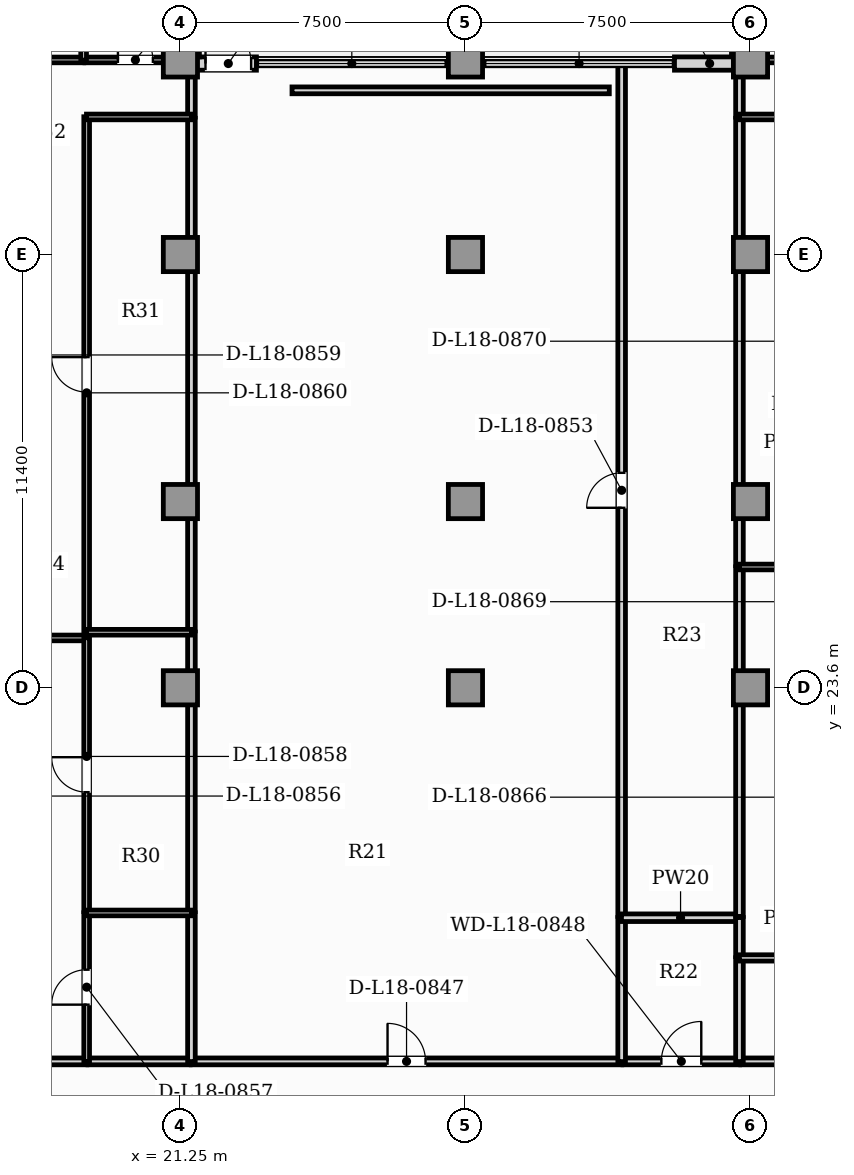
"""IFC4 building model, lengths in metres.
Left out: names, types, materials, properties, quantities, classifications, styles, units other than length and angle.
Written with IfcOpenShell. Run it as: python <this file> out.ifc"""

import sys

from ifc_helpers import new_model, si_unit, direction, frame, frame_2d, origin, origin_2d, place, context, subcontext, project, spatial, rectangle, extrude, element, fill, save


model = new_model("IFC4")
c1 = context("Model", 3, precision=1e-05, world=origin(), true_north=direction((0.0, 1.0)))
c2 = subcontext(c1, "Body", "Model", "MODEL_VIEW")
j1 = project(units=[si_unit("LENGTHUNIT", "METRE"), si_unit("PLANEANGLEUNIT", "RADIAN")], contexts=[c1])
p1 = place(None, origin())
s1 = spatial("IfcSite", under=j1, at=p1, CompositionType="ELEMENT")
p2 = place(p1, origin())
s2 = spatial("IfcBuilding", under=s1, at=p2, CompositionType="ELEMENT")
p3 = place(p2, frame((0.0, 0.0, 76.0)))
s3 = spatial("IfcBuildingStorey", under=s2, at=p3, CompositionType="ELEMENT", Elevation=76.0)
for number, where, z_axis, x_axis in (
    (1, (21.25, 23.6, 0.0), (0.0, 0.0, 1.0), (1.0, 0.0, 0.0)),
    (2, (28.75, 23.6, 0.0), (0.0, 0.0, 1.0), (1.0, 0.0, 0.0)),
    (3, (36.25, 23.6, 0.0), (0.0, 0.0, 1.0), (1.0, 0.0, 0.0)),
    (4, (21.25, 28.5, 0.0), (0.0, 0.0, 1.0), (1.0, 0.0, 0.0)),
    (5, (28.75, 28.5, 0.0), (0.0, 0.0, 1.0), (1.0, 0.0, 0.0)),
    (6, (36.25, 28.5, 0.0), (0.0, 0.0, 1.0), (1.0, 0.0, 0.0)),
    (7, (21.25, 40.12, 0.0), (0.0, 0.0, 1.0), (1.0, 0.0, 0.0)),
    (8, (28.75, 40.12, 0.0), (0.0, 0.0, 1.0), (1.0, 0.0, 0.0)),
    (9, (36.25, 40.12, 0.0), (0.0, 0.0, 1.0), (1.0, 0.0, 0.0)),
    (10, (21.25, 35.0, 0.0), (0.0, 0.0, 1.0), (1.0, 0.0, 0.0)),
    (11, (28.75, 35.0, 0.0), (0.0, 0.0, 1.0), (1.0, 0.0, 0.0)),
    (12, (36.25, 35.0, 0.0), (0.0, 0.0, 1.0), (1.0, 0.0, 0.0)),
):
    element("IfcColumn", number, at=place(p3, frame(where, z_axis=z_axis, x_axis=x_axis)), inside=s3, PredefinedType="COLUMN", context=c2, shape_type="SweptSolid", body=[
        extrude(rectangle(XDim=0.9, YDim=0.9, at=origin_2d()), origin(), (0.0, 0.0, 1.0), 5.05),
    ])
p4 = place(p3, frame((35.925, 46.36, 0.0), z_axis=(0.0, 0.0, 1.0), x_axis=(0.0, -1.0, 0.0)))
e13 = element("IfcWall", 13, at=p4, inside=s3, PredefinedType="SOLIDWALL", context=c2, shape_type="SweptSolid", body=[
    extrude(rectangle(XDim=6.16, YDim=0.35, at=frame_2d((3.08, 0.0))), origin(), (0.0, 0.0, 1.0), 4.8),
])
p5 = place(p3, frame((21.4, 40.025, 0.0), z_axis=(0.0, 0.0, 1.0), x_axis=(1.0, 0.0, 0.0)))
e14 = element("IfcWall", 14, at=p5, inside=s3, PredefinedType="SOLIDWALL", context=c2, shape_type="SweptSolid", body=[
    extrude(rectangle(XDim=1.85, YDim=0.35, at=frame_2d((0.925, 0.0))), origin(), (0.0, 0.0, 1.0), 4.8),
])
p6 = place(p5, frame((0.51, 0.0, 0.0)))
e15 = element("IfcOpeningElement", 15, at=p6, cuts=e14, PredefinedType="OPENING", context=c2, shape_type="SweptSolid", body=[
    extrude(rectangle(XDim=1.2, YDim=2.2, at=frame_2d((0.6, 1.1))), frame((0.0, 0.185, 0.0), z_axis=(0.0, -1.0, 0.0), x_axis=(1.0, 0.0, 0.0)), (0.0, 0.0, 1.0), 0.37),
])
p7 = place(p3, frame((34.25, 40.025, 0.0), z_axis=(0.0, 0.0, 1.0), x_axis=(1.0, 0.0, 0.0)))
e16 = element("IfcWall", 16, at=p7, inside=s3, PredefinedType="SOLIDWALL", context=c2, shape_type="SweptSolid", body=[
    extrude(rectangle(XDim=1.85, YDim=0.35, at=frame_2d((0.925, 0.0))), origin(), (0.0, 0.0, 1.0), 4.8),
])
p8 = place(p3, frame((21.575, 40.2, 0.0), z_axis=(0.0, 0.0, 1.0), x_axis=(0.0, 1.0, 0.0)))
e17 = element("IfcWall", 17, at=p8, inside=s3, PredefinedType="SOLIDWALL", context=c2, shape_type="SweptSolid", body=[
    extrude(rectangle(XDim=6.16, YDim=0.35, at=frame_2d((3.08, 0.0))), origin(), (0.0, 0.0, 1.0), 4.8),
])
p9 = place(p8, frame((0.77, 0.0, 0.88)))
e18 = element("IfcOpeningElement", 18, at=p9, cuts=e17, PredefinedType="OPENING", context=c2, shape_type="SweptSolid", body=[
    extrude(rectangle(XDim=1.65, YDim=2.0, at=frame_2d((0.825, 1.0))), frame((0.0, 0.185, 0.0), z_axis=(0.0, -1.0, 0.0), x_axis=(1.0, 0.0, 0.0)), (0.0, 0.0, 1.0), 0.37),
])
p10 = place(p3, frame((21.535, 13.77, 0.0), z_axis=(0.0, 0.0, 1.0), x_axis=(1.0, 0.0, 0.0)))
e19 = element("IfcWall", 19, at=p10, inside=s3, PredefinedType="PARTITIONING", context=c2, shape_type="SweptSolid", body=[
    extrude(rectangle(XDim=11.33, YDim=0.18, at=frame_2d((5.665, 0.0))), origin(), (0.0, 0.0, 1.0), 4.8),
])
p11 = place(p10, frame((5.165, 0.0, 0.0)))
e20 = element("IfcOpeningElement", 20, at=p11, cuts=e19, PredefinedType="OPENING", context=c2, shape_type="SweptSolid", body=[
    extrude(rectangle(XDim=1.0, YDim=2.15, at=frame_2d((0.5, 1.075))), frame((0.0, 0.1, 0.0), z_axis=(0.0, -1.0, 0.0), x_axis=(1.0, 0.0, 0.0)), (0.0, 0.0, 1.0), 0.2),
])
p12 = place(p3, frame((32.895, 13.77, 0.0), z_axis=(0.0, 0.0, 1.0), x_axis=(1.0, 0.0, 0.0)))
e21 = element("IfcWall", 21, at=p12, inside=s3, PredefinedType="PARTITIONING", context=c2, shape_type="SweptSolid", body=[
    extrude(rectangle(XDim=3.07, YDim=0.18, at=frame_2d((1.535, 0.0))), origin(), (0.0, 0.0, 1.0), 4.8),
])
p13 = place(p12, frame((1.01, 0.0, 0.0)))
e22 = element("IfcOpeningElement", 22, at=p13, cuts=e21, PredefinedType="OPENING", context=c2, shape_type="SweptSolid", body=[
    extrude(rectangle(XDim=1.05, YDim=2.15, at=frame_2d((0.525, 1.075))), frame((0.0, 0.1, 0.0), z_axis=(0.0, -1.0, 0.0), x_axis=(1.0, 0.0, 0.0)), (0.0, 0.0, 1.0), 0.2),
])
p14 = place(p3, frame((14.602, 13.77, 0.0), z_axis=(0.0, 0.0, 1.0), x_axis=(1.0, 0.0, 0.0)))
e23 = element("IfcWall", 23, at=p14, inside=s3, PredefinedType="PARTITIONING", context=c2, shape_type="SweptSolid", body=[
    extrude(rectangle(XDim=4.186, YDim=0.18, at=frame_2d((2.093, 0.0))), origin(), (0.0, 0.0, 1.0), 4.8),
])
p15 = place(p14, frame((1.593, 0.0, 0.0)))
e24 = element("IfcOpeningElement", 24, at=p15, cuts=e23, PredefinedType="OPENING", context=c2, shape_type="SweptSolid", body=[
    extrude(rectangle(XDim=1.0, YDim=2.15, at=frame_2d((0.5, 1.075))), frame((0.0, 0.1, 0.0), z_axis=(0.0, -1.0, 0.0), x_axis=(1.0, 0.0, 0.0)), (0.0, 0.0, 1.0), 0.2),
])
p16 = place(p3, frame((18.818, 13.77, 0.0), z_axis=(0.0, 0.0, 1.0), x_axis=(1.0, 0.0, 0.0)))
e25 = element("IfcWall", 25, at=p16, inside=s3, PredefinedType="PARTITIONING", context=c2, shape_type="SweptSolid", body=[
    extrude(rectangle(XDim=2.687, YDim=0.18, at=frame_2d((1.343, 0.0))), origin(), (0.0, 0.0, 1.0), 4.8),
])
p17 = place(p3, frame((35.995, 13.77, 0.0), z_axis=(0.0, 0.0, 1.0), x_axis=(1.0, 0.0, 0.0)))
e26 = element("IfcWall", 26, at=p17, inside=s3, PredefinedType="PARTITIONING", context=c2, shape_type="SweptSolid", body=[
    extrude(rectangle(XDim=2.706, YDim=0.18, at=frame_2d((1.353, 0.0))), origin(), (0.0, 0.0, 1.0), 4.8),
])
p18 = place(p3, frame((32.86, 13.765, 0.0), z_axis=(0.0, 0.0, 1.0), x_axis=(0.0, 1.0, 0.0)))
e27 = element("IfcWall", 27, at=p18, inside=s3, PredefinedType="PARTITIONING", context=c2, shape_type="SweptSolid", body=[
    extrude(rectangle(XDim=3.79, YDim=0.2, at=frame_2d((1.895, 0.0))), origin(), (0.0, 0.0, 1.0), 4.8),
])
p19 = place(p3, frame((32.86, 17.585, 0.0), z_axis=(0.0, 0.0, 1.0), x_axis=(0.0, 1.0, 0.0)))
e28 = element("IfcWall", 28, at=p19, inside=s3, PredefinedType="PARTITIONING", context=c2, shape_type="SweptSolid", body=[
    extrude(rectangle(XDim=22.422, YDim=0.2, at=frame_2d((11.211, 0.0))), origin(), (0.0, 0.0, 1.0), 4.8),
])
p20 = place(p19, frame((10.751, 0.0, 0.0)))
e29 = element("IfcOpeningElement", 29, at=p20, cuts=e28, PredefinedType="OPENING", context=c2, shape_type="SweptSolid", body=[
    extrude(rectangle(XDim=0.92, YDim=2.1, at=frame_2d((0.46, 1.05))), frame((0.0, 0.11, 0.0), z_axis=(0.0, -1.0, 0.0), x_axis=(1.0, 0.0, 0.0)), (0.0, 0.0, 1.0), 0.22),
])
p21 = place(p3, frame((21.54, 38.615, 0.0), z_axis=(0.0, 0.0, 1.0), x_axis=(0.0, 1.0, 0.0)))
e30 = element("IfcWall", 30, at=p21, inside=s3, PredefinedType="PARTITIONING", context=c2, shape_type="SweptSolid", body=[
    extrude(rectangle(XDim=1.375, YDim=0.2, at=frame_2d((0.688, 0.0))), origin(), (0.0, 0.0, 1.0), 4.8),
])
p22 = place(p3, frame((21.54, 13.765, 0.0), z_axis=(0.0, 0.0, 1.0), x_axis=(0.0, 1.0, 0.0)))
e31 = element("IfcWall", 31, at=p22, inside=s3, PredefinedType="PARTITIONING", context=c2, shape_type="SweptSolid", body=[
    extrude(rectangle(XDim=3.916, YDim=0.2, at=frame_2d((1.958, 0.0))), origin(), (0.0, 0.0, 1.0), 4.8),
])
p23 = place(p3, frame((21.54, 17.711, 0.0), z_axis=(0.0, 0.0, 1.0), x_axis=(0.0, 1.0, 0.0)))
e32 = element("IfcWall", 32, at=p23, inside=s3, PredefinedType="PARTITIONING", context=c2, shape_type="SweptSolid", body=[
    extrude(rectangle(XDim=7.356, YDim=0.2, at=frame_2d((3.678, 0.0))), origin(), (0.0, 0.0, 1.0), 4.8),
])
p24 = place(p3, frame((21.54, 25.097, 0.0), z_axis=(0.0, 0.0, 1.0), x_axis=(0.0, 1.0, 0.0)))
e33 = element("IfcWall", 33, at=p24, inside=s3, PredefinedType="PARTITIONING", context=c2, shape_type="SweptSolid", body=[
    extrude(rectangle(XDim=13.488, YDim=0.2, at=frame_2d((6.744, 0.0))), origin(), (0.0, 0.0, 1.0), 4.8),
])
p25 = place(p3, frame((32.855, 17.55, 0.0), z_axis=(0.0, 0.0, 1.0), x_axis=(1.0, 0.0, 0.0)))
e34 = element("IfcWall", 34, at=p25, inside=s3, PredefinedType="PARTITIONING", context=c2, shape_type="SweptSolid", body=[
    extrude(rectangle(XDim=3.11, YDim=0.2, at=frame_2d((1.555, 0.0))), origin(), (0.0, 0.0, 1.0), 4.8),
])
p26 = place(p3, frame((35.96, 13.765, 0.0), z_axis=(0.0, 0.0, 1.0), x_axis=(0.0, 1.0, 0.0)))
e35 = element("IfcWall", 35, at=p26, inside=s3, PredefinedType="PARTITIONING", context=c2, shape_type="SweptSolid", body=[
    extrude(rectangle(XDim=2.732, YDim=0.2, at=frame_2d((1.366, 0.0))), origin(), (0.0, 0.0, 1.0), 4.8),
])
p27 = place(p3, frame((35.96, 16.527, 0.0), z_axis=(0.0, 0.0, 1.0), x_axis=(0.0, 1.0, 0.0)))
e36 = element("IfcWall", 36, at=p27, inside=s3, PredefinedType="PARTITIONING", context=c2, shape_type="SweptSolid", body=[
    extrude(rectangle(XDim=1.028, YDim=0.2, at=frame_2d((0.514, 0.0))), origin(), (0.0, 0.0, 1.0), 4.8),
])
p28 = place(p3, frame((35.96, 38.615, 0.0), z_axis=(0.0, 0.0, 1.0), x_axis=(0.0, 1.0, 0.0)))
e37 = element("IfcWall", 37, at=p28, inside=s3, PredefinedType="PARTITIONING", context=c2, shape_type="SweptSolid", body=[
    extrude(rectangle(XDim=1.375, YDim=0.2, at=frame_2d((0.688, 0.0))), origin(), (0.0, 0.0, 1.0), 4.8),
])
p29 = place(p3, frame((35.96, 17.585, 0.0), z_axis=(0.0, 0.0, 1.0), x_axis=(0.0, 1.0, 0.0)))
e38 = element("IfcWall", 38, at=p29, inside=s3, PredefinedType="PARTITIONING", context=c2, shape_type="SweptSolid", body=[
    extrude(rectangle(XDim=9.198, YDim=0.2, at=frame_2d((4.599, 0.0))), origin(), (0.0, 0.0, 1.0), 4.8),
])
p30 = place(p3, frame((35.96, 26.813, 0.0), z_axis=(0.0, 0.0, 1.0), x_axis=(0.0, 1.0, 0.0)))
e39 = element("IfcWall", 39, at=p30, inside=s3, PredefinedType="PARTITIONING", context=c2, shape_type="SweptSolid", body=[
    extrude(rectangle(XDim=11.771, YDim=0.2, at=frame_2d((5.886, 0.0))), origin(), (0.0, 0.0, 1.0), 4.8),
])
p31 = place(p3, frame((14.602, 24.912, 0.0), z_axis=(0.0, 0.0, 1.0), x_axis=(1.0, 0.0, 0.0)))
e40 = element("IfcWall", 40, at=p31, inside=s3, PredefinedType="PARTITIONING", context=c2, shape_type="SweptSolid", body=[
    extrude(rectangle(XDim=4.186, YDim=0.15, at=frame_2d((2.093, 0.0))), origin(), (0.0, 0.0, 1.0), 4.8),
])
p32 = place(p31, frame((1.633, 0.0, 0.0)))
e41 = element("IfcOpeningElement", 41, at=p32, cuts=e40, PredefinedType="OPENING", context=c2, shape_type="SweptSolid", body=[
    extrude(rectangle(XDim=0.92, YDim=2.1, at=frame_2d((0.46, 1.05))), frame((0.0, 0.085, 0.0), z_axis=(0.0, -1.0, 0.0), x_axis=(1.0, 0.0, 0.0)), (0.0, 0.0, 1.0), 0.17),
])
p33 = place(p3, frame((18.783, 13.765, 0.0), z_axis=(0.0, 0.0, 1.0), x_axis=(0.0, 1.0, 0.0)))
e42 = element("IfcWall", 42, at=p33, inside=s3, PredefinedType="PARTITIONING", context=c2, shape_type="SweptSolid", body=[
    extrude(rectangle(XDim=3.916, YDim=0.15, at=frame_2d((1.958, 0.0))), origin(), (0.0, 0.0, 1.0), 4.8),
])
p34 = place(p33, frame((1.498, 0.0, 0.0)))
e43 = element("IfcOpeningElement", 43, at=p34, cuts=e42, PredefinedType="OPENING", context=c2, shape_type="SweptSolid", body=[
    extrude(rectangle(XDim=0.92, YDim=2.1, at=frame_2d((0.46, 1.05))), frame((0.0, 0.085, 0.0), z_axis=(0.0, -1.0, 0.0), x_axis=(1.0, 0.0, 0.0)), (0.0, 0.0, 1.0), 0.17),
])
p35 = place(p3, frame((18.783, 17.711, 0.0), z_axis=(0.0, 0.0, 1.0), x_axis=(0.0, 1.0, 0.0)))
e44 = element("IfcWall", 44, at=p35, inside=s3, PredefinedType="PARTITIONING", context=c2, shape_type="SweptSolid", body=[
    extrude(rectangle(XDim=7.206, YDim=0.15, at=frame_2d((3.603, 0.0))), origin(), (0.0, 0.0, 1.0), 4.8),
])
p36 = place(p35, frame((3.143, 0.0, 0.0)))
e45 = element("IfcOpeningElement", 45, at=p36, cuts=e44, PredefinedType="OPENING", context=c2, shape_type="SweptSolid", body=[
    extrude(rectangle(XDim=0.92, YDim=2.1, at=frame_2d((0.46, 1.05))), frame((0.0, 0.085, 0.0), z_axis=(0.0, -1.0, 0.0), x_axis=(1.0, 0.0, 0.0)), (0.0, 0.0, 1.0), 0.17),
])
p37 = place(p3, frame((18.783, 25.057, 0.0), z_axis=(0.0, 0.0, 1.0), x_axis=(0.0, 1.0, 0.0)))
e46 = element("IfcWall", 46, at=p37, inside=s3, PredefinedType="PARTITIONING", context=c2, shape_type="SweptSolid", body=[
    extrude(rectangle(XDim=13.568, YDim=0.15, at=frame_2d((6.784, 0.0))), origin(), (0.0, 0.0, 1.0), 4.8),
])
p38 = place(p37, frame((6.324, 0.0, 0.0)))
e47 = element("IfcOpeningElement", 47, at=p38, cuts=e46, PredefinedType="OPENING", context=c2, shape_type="SweptSolid", body=[
    extrude(rectangle(XDim=0.92, YDim=2.1, at=frame_2d((0.46, 1.05))), frame((0.0, 0.085, 0.0), z_axis=(0.0, -1.0, 0.0), x_axis=(1.0, 0.0, 0.0)), (0.0, 0.0, 1.0), 0.17),
])
p39 = place(p3, frame((18.778, 38.62, 0.0), z_axis=(0.0, 0.0, 1.0), x_axis=(1.0, 0.0, 0.0)))
e48 = element("IfcWall", 48, at=p39, inside=s3, PredefinedType="PARTITIONING", context=c2, shape_type="SweptSolid", body=[
    extrude(rectangle(XDim=2.767, YDim=0.15, at=frame_2d((1.383, 0.0))), origin(), (0.0, 0.0, 1.0), 4.8),
])
p40 = place(p3, frame((15.711, 40.12, 0.0), z_axis=(0.0, 0.0, 1.0), x_axis=(1.0, 0.0, 0.0)))
e49 = element("IfcWall", 49, at=p40, inside=s3, PredefinedType="PARTITIONING", context=c2, shape_type="SweptSolid", body=[
    extrude(rectangle(XDim=2.997, YDim=0.15, at=frame_2d((1.499, 0.0))), origin(), (0.0, 0.0, 1.0), 4.8),
])
p41 = place(p40, frame((1.039, 0.0, 0.0)))
e50 = element("IfcOpeningElement", 50, at=p41, cuts=e49, PredefinedType="OPENING", context=c2, shape_type="SweptSolid", body=[
    extrude(rectangle(XDim=0.92, YDim=2.1, at=frame_2d((0.46, 1.05))), frame((0.0, 0.085, 0.0), z_axis=(0.0, -1.0, 0.0), x_axis=(1.0, 0.0, 0.0)), (0.0, 0.0, 1.0), 0.17),
])
p42 = place(p3, frame((18.738, 40.12, 0.0), z_axis=(0.0, 0.0, 1.0), x_axis=(1.0, 0.0, 0.0)))
e51 = element("IfcWall", 51, at=p42, inside=s3, PredefinedType="PARTITIONING", context=c2, shape_type="SweptSolid", body=[
    extrude(rectangle(XDim=2.656, YDim=0.15, at=frame_2d((1.328, 0.0))), origin(), (0.0, 0.0, 1.0), 4.8),
])
p43 = place(p42, frame((0.868, 0.0, 0.0)))
e52 = element("IfcOpeningElement", 52, at=p43, cuts=e51, PredefinedType="OPENING", context=c2, shape_type="SweptSolid", body=[
    extrude(rectangle(XDim=0.92, YDim=2.1, at=frame_2d((0.46, 1.05))), frame((0.0, 0.085, 0.0), z_axis=(0.0, -1.0, 0.0), x_axis=(1.0, 0.0, 0.0)), (0.0, 0.0, 1.0), 0.17),
])
for number, where, z_axis, x_axis in (
    (53, (18.778, 17.676, 0.0), (0.0, 0.0, 1.0), (1.0, 0.0, 0.0)),
    (54, (18.778, 25.062, 0.0), (0.0, 0.0, 1.0), (1.0, 0.0, 0.0)),
):
    element("IfcWall", number, at=place(p3, frame(where, z_axis=z_axis, x_axis=x_axis)), inside=s3, PredefinedType="PARTITIONING", context=c2, shape_type="SweptSolid", body=[
        extrude(rectangle(XDim=2.767, YDim=0.15, at=frame_2d((1.383, 0.0))), origin(), (0.0, 0.0, 1.0), 4.8),
    ])
p44 = place(p3, frame((18.703, 40.115, 0.0), z_axis=(0.0, 0.0, 1.0), x_axis=(0.0, 1.0, 0.0)))
e55 = element("IfcWall", 55, at=p44, inside=s3, PredefinedType="PARTITIONING", context=c2, shape_type="SweptSolid", body=[
    extrude(rectangle(XDim=6.075, YDim=0.15, at=frame_2d((3.038, 0.0))), origin(), (0.0, 0.0, 1.0), 4.8),
])
p45 = place(p3, frame((35.955, 38.62, 0.0), z_axis=(0.0, 0.0, 1.0), x_axis=(1.0, 0.0, 0.0)))
e56 = element("IfcWall", 56, at=p45, inside=s3, PredefinedType="PARTITIONING", context=c2, shape_type="SweptSolid", body=[
    extrude(rectangle(XDim=2.786, YDim=0.15, at=frame_2d((1.393, 0.0))), origin(), (0.0, 0.0, 1.0), 4.8),
])
p46 = place(p3, frame((36.107, 40.12, 0.0), z_axis=(0.0, 0.0, 1.0), x_axis=(1.0, 0.0, 0.0)))
e57 = element("IfcWall", 57, at=p46, inside=s3, PredefinedType="PARTITIONING", context=c2, shape_type="SweptSolid", body=[
    extrude(rectangle(XDim=5.23, YDim=0.15, at=frame_2d((2.615, 0.0))), origin(), (0.0, 0.0, 1.0), 4.8),
])
p47 = place(p46, frame((2.155, 0.0, 0.0)))
e58 = element("IfcOpeningElement", 58, at=p47, cuts=e57, PredefinedType="OPENING", context=c2, shape_type="SweptSolid", body=[
    extrude(rectangle(XDim=0.92, YDim=2.1, at=frame_2d((0.46, 1.05))), frame((0.0, 0.085, 0.0), z_axis=(0.0, -1.0, 0.0), x_axis=(1.0, 0.0, 0.0)), (0.0, 0.0, 1.0), 0.17),
])
p48 = place(p3, frame((35.955, 16.492, 0.0), z_axis=(0.0, 0.0, 1.0), x_axis=(1.0, 0.0, 0.0)))
e59 = element("IfcWall", 59, at=p48, inside=s3, PredefinedType="PLUMBINGWALL", context=c2, shape_type="SweptSolid", body=[
    extrude(rectangle(XDim=2.786, YDim=0.165, at=frame_2d((1.393, 0.0))), origin(), (0.0, 0.0, 1.0), 4.8),
])
p49 = place(p3, frame((35.955, 26.778, 0.0), z_axis=(0.0, 0.0, 1.0), x_axis=(1.0, 0.0, 0.0)))
e60 = element("IfcWall", 60, at=p49, inside=s3, PredefinedType="PARTITIONING", context=c2, shape_type="SweptSolid", body=[
    extrude(rectangle(XDim=2.786, YDim=0.15, at=frame_2d((1.393, 0.0))), origin(), (0.0, 0.0, 1.0), 4.8),
])
p50 = place(p3, frame((24.187, 39.32, 0.0), z_axis=(0.0, 0.0, 1.0), x_axis=(1.0, 0.0, 0.0)))
e61 = element("IfcWall", 61, at=p50, inside=s3, PredefinedType="PARTITIONING", context=c2, shape_type="SweptSolid", body=[
    extrude(rectangle(XDim=8.348, YDim=0.18, at=frame_2d((4.174, 0.0))), origin(), (0.0, 0.0, 1.0), 4.8),
])
p51 = place(p6, origin())
e62 = element("IfcDoor", 62, at=p51, inside=s3, OperationType="SINGLE_SWING_LEFT", PredefinedType="DOOR", context=c2, shape_type="SweptSolid", body=[
    extrude(rectangle(XDim=1.2, YDim=2.2, at=frame_2d((0.6, 1.1))), frame((0.0, 0.025, 0.0), z_axis=(0.0, -1.0, 0.0), x_axis=(1.0, 0.0, 0.0)), (0.0, 0.0, 1.0), 0.05),
])
fill(e15, e62)
p52 = place(p11, origin())
e63 = element("IfcDoor", 63, at=p52, inside=s3, OperationType="SINGLE_SWING_LEFT", PredefinedType="DOOR", context=c2, shape_type="SweptSolid", body=[
    extrude(rectangle(XDim=1.0, YDim=2.15, at=frame_2d((0.5, 1.075))), frame((0.0, 0.025, 0.0), z_axis=(0.0, -1.0, 0.0), x_axis=(1.0, 0.0, 0.0)), (0.0, 0.0, 1.0), 0.05),
])
fill(e20, e63)
p53 = place(p13, origin())
e64 = element("IfcDoor", 64, at=p53, inside=s3, OperationType="SINGLE_SWING_RIGHT", PredefinedType="DOOR", context=c2, shape_type="SweptSolid", body=[
    extrude(rectangle(XDim=1.05, YDim=2.15, at=frame_2d((0.525, 1.075))), frame((0.0, 0.025, 0.0), z_axis=(0.0, -1.0, 0.0), x_axis=(1.0, 0.0, 0.0)), (0.0, 0.0, 1.0), 0.05),
])
fill(e22, e64)
p54 = place(p20, origin())
e65 = element("IfcDoor", 65, at=p54, inside=s3, OperationType="SINGLE_SWING_LEFT", PredefinedType="DOOR", context=c2, shape_type="SweptSolid", body=[
    extrude(rectangle(XDim=0.92, YDim=2.1, at=frame_2d((0.46, 1.05))), frame((0.0, 0.025, 0.0), z_axis=(0.0, -1.0, 0.0), x_axis=(1.0, 0.0, 0.0)), (0.0, 0.0, 1.0), 0.05),
])
fill(e29, e65)
p55 = place(p34, origin())
e66 = element("IfcDoor", 66, at=p55, inside=s3, OperationType="SINGLE_SWING_LEFT", PredefinedType="DOOR", context=c2, shape_type="SweptSolid", body=[
    extrude(rectangle(XDim=0.92, YDim=2.1, at=frame_2d((0.46, 1.05))), frame((0.0, 0.025, 0.0), z_axis=(0.0, -1.0, 0.0), x_axis=(1.0, 0.0, 0.0)), (0.0, 0.0, 1.0), 0.05),
])
fill(e43, e66)
p56 = place(p36, origin())
e67 = element("IfcDoor", 67, at=p56, inside=s3, OperationType="SINGLE_SWING_RIGHT", PredefinedType="DOOR", context=c2, shape_type="SweptSolid", body=[
    extrude(rectangle(XDim=0.92, YDim=2.1, at=frame_2d((0.46, 1.05))), frame((0.0, 0.025, 0.0), z_axis=(0.0, -1.0, 0.0), x_axis=(1.0, 0.0, 0.0)), (0.0, 0.0, 1.0), 0.05),
])
fill(e45, e67)
p57 = place(p38, origin())
e68 = element("IfcDoor", 68, at=p57, inside=s3, OperationType="SINGLE_SWING_RIGHT", PredefinedType="DOOR", context=c2, shape_type="SweptSolid", body=[
    extrude(rectangle(XDim=0.92, YDim=2.1, at=frame_2d((0.46, 1.05))), frame((0.0, 0.025, 0.0), z_axis=(0.0, -1.0, 0.0), x_axis=(1.0, 0.0, 0.0)), (0.0, 0.0, 1.0), 0.05),
])
fill(e47, e68)
p58 = place(p43, origin())
e69 = element("IfcDoor", 69, at=p58, inside=s3, OperationType="SINGLE_SWING_LEFT", PredefinedType="DOOR", context=c2, shape_type="SweptSolid", body=[
    extrude(rectangle(XDim=0.92, YDim=2.1, at=frame_2d((0.46, 1.05))), frame((0.0, 0.025, 0.0), z_axis=(0.0, -1.0, 0.0), x_axis=(1.0, 0.0, 0.0)), (0.0, 0.0, 1.0), 0.05),
])
fill(e52, e69)
save(model, sys.argv[1])
